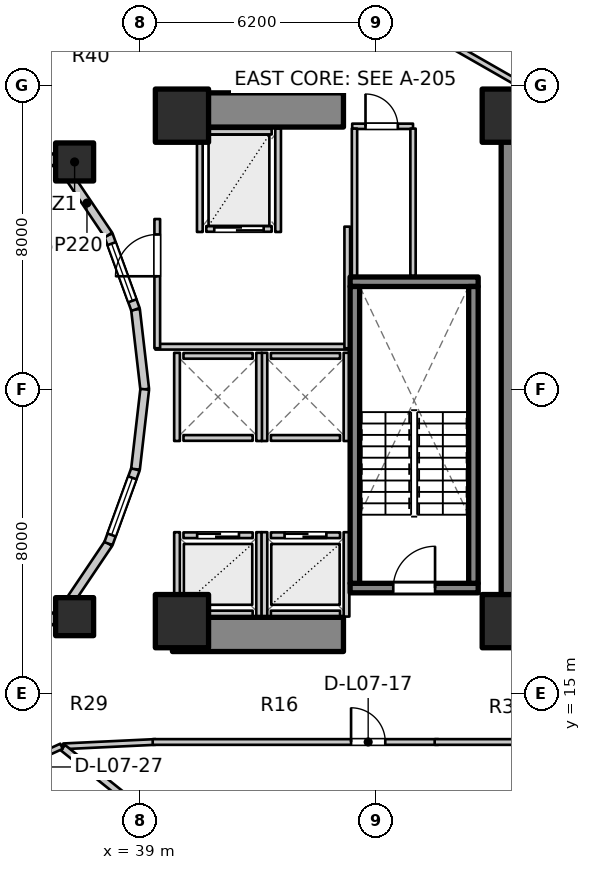
"""IFC4 building model, lengths in metres.
Left out: names, types, materials, properties, quantities, classifications, styles, units other than length and angle.
Written with IfcOpenShell. Run it as: python <this file> out.ifc"""

import sys

from ifc_helpers import new_model, si_unit, direction, frame, frame_2d, origin, origin_2d, place, context, subcontext, project, spatial, rectangle, extrude, element, fill, save


model = new_model("IFC4")
c1 = context("Model", 3, precision=1e-05, world=origin(), true_north=direction((0.0, 1.0)))
c2 = subcontext(c1, "Body", "Model", "MODEL_VIEW")
j1 = project(units=[si_unit("LENGTHUNIT", "METRE"), si_unit("PLANEANGLEUNIT", "RADIAN")], contexts=[c1])
p1 = place(None, origin())
s1 = spatial("IfcSite", under=j1, at=p1, CompositionType="ELEMENT")
p2 = place(p1, origin())
s2 = spatial("IfcBuilding", under=s1, at=p2, CompositionType="ELEMENT")
p3 = place(p2, frame((0.0, 0.0, 27.6)))
s3 = spatial("IfcBuildingStorey", under=s2, at=p3, CompositionType="ELEMENT", Elevation=27.6)
p4 = place(p3, frame((48.95, 17.05, 0.0), z_axis=(0.0, 0.0, 1.0), x_axis=(0.0, 1.0, 0.0)))
e1 = element("IfcWall", 1, at=p4, inside=s3, PredefinedType="SHEAR", context=c2, shape_type="SweptSolid", body=[
    extrude(rectangle(XDim=12.8, YDim=0.9, at=frame_2d((6.4, 0.0))), origin(), (0.0, 0.0, 1.0), 3.1),
])
for number, where, z_axis, x_axis in (
    (2, (39.85, 16.55, 0.0), (0.0, 0.0, 1.0), (1.0, 0.0, 0.0)),
    (3, (39.85, 30.35, 0.0), (0.0, 0.0, 1.0), (1.0, 0.0, 0.0)),
):
    element("IfcWall", number, at=place(p3, frame(where, z_axis=z_axis, x_axis=x_axis)), inside=s3, PredefinedType="SHEAR", context=c2, shape_type="SweptSolid", body=[
        extrude(rectangle(XDim=4.5, YDim=0.9, at=frame_2d((2.25, 0.0))), origin(), (0.0, 0.0, 1.0), 3.1),
    ])
p5 = place(p3, frame((44.525, 17.77, 0.0), z_axis=(0.0, 0.0, 1.0), x_axis=(1.0, 0.0, 0.0)))
e4 = element("IfcWall", 4, at=p5, inside=s3, PredefinedType="SOLIDWALL", context=c2, shape_type="SweptSolid", body=[
    extrude(rectangle(XDim=3.37, YDim=0.25, at=frame_2d((1.685, 0.0))), origin(), (0.0, 0.0, 1.0), 3.1),
])
p6 = place(p5, frame((1.135, 0.0, 0.0)))
e5 = element("IfcOpeningElement", 5, at=p6, cuts=e4, PredefinedType="OPENING", context=c2, shape_type="SweptSolid", body=[
    extrude(rectangle(XDim=1.1, YDim=2.1, at=frame_2d((0.55, 1.05))), frame((0.0, 0.135, 0.0), z_axis=(0.0, -1.0, 0.0), x_axis=(1.0, 0.0, 0.0)), (0.0, 0.0, 1.0), 0.27),
])
p7 = place(p3, frame((44.525, 25.83, 0.0), z_axis=(0.0, 0.0, 1.0), x_axis=(1.0, 0.0, 0.0)))
e6 = element("IfcWall", 6, at=p7, inside=s3, PredefinedType="SOLIDWALL", context=c2, shape_type="SweptSolid", body=[
    extrude(rectangle(XDim=3.37, YDim=0.25, at=frame_2d((1.685, 0.0))), origin(), (0.0, 0.0, 1.0), 3.1),
])
for number, where, z_axis, x_axis in (
    (7, (44.65, 17.895, 0.0), (0.0, 0.0, 1.0), (0.0, 1.0, 0.0)),
    (8, (47.77, 17.895, 0.0), (0.0, 0.0, 1.0), (0.0, 1.0, 0.0)),
):
    element("IfcWall", number, at=place(p3, frame(where, z_axis=z_axis, x_axis=x_axis)), inside=s3, PredefinedType="SOLIDWALL", context=c2, shape_type="SweptSolid", body=[
        extrude(rectangle(XDim=7.81, YDim=0.25, at=frame_2d((3.905, 0.0))), origin(), (0.0, 0.0, 1.0), 3.1),
    ])
for number, where, z_axis, x_axis in (
    (9, (40.1, 16.9, 0.0), (0.0, 0.0, 1.0), (1.0, 0.0, 0.0)),
    (10, (48.7, 16.9, 0.0), (0.0, 0.0, 1.0), (1.0, 0.0, 0.0)),
    (11, (48.7, 30.2, 0.0), (0.0, 0.0, 1.0), (1.0, 0.0, 0.0)),
    (12, (40.1, 30.2, 0.0), (0.0, 0.0, 1.0), (1.0, 0.0, 0.0)),
):
    element("IfcColumn", number, at=place(p3, frame(where, z_axis=z_axis, x_axis=x_axis)), inside=s3, PredefinedType="COLUMN", context=c2, shape_type="SweptSolid", body=[
        extrude(rectangle(XDim=1.4, YDim=1.4, at=origin_2d()), origin(), (0.0, 0.0, 1.0), 3.1),
    ])
for number, where, z_axis, x_axis in (
    (13, (37.275, 28.982, 0.0), (0.0, 0.0, 1.0), (1.0, 0.0, 0.0)),
    (14, (37.275, 17.018, 0.0), (0.0, 0.0, 1.0), (1.0, 0.0, 0.0)),
):
    element("IfcColumn", number, at=place(p3, frame(where, z_axis=z_axis, x_axis=x_axis)), inside=s3, PredefinedType="COLUMN", context=c2, shape_type="SweptSolid", body=[
        extrude(rectangle(XDim=1.0, YDim=1.0, at=origin_2d()), origin(), (0.0, 0.0, 1.0), 3.1),
    ])
p8 = place(p3, frame((39.12, 23.0, 0.0), z_axis=(0.0, 0.0, 1.0), x_axis=(-0.114711713601, 0.993398823617, 0.0)))
e15 = element("IfcWall", 15, at=p8, inside=s3, PredefinedType="STANDARD", context=c2, shape_type="SweptSolid", body=[
    extrude(rectangle(XDim=2.115, YDim=0.23, at=frame_2d((1.058, 0.0))), origin(), (0.0, 0.0, 1.0), 2.84),
])
p9 = place(p3, frame((38.877, 25.102, 0.0), z_axis=(0.0, 0.0, 1.0), x_axis=(-0.341423187295, 0.93990968033, 0.0)))
e16 = element("IfcWall", 16, at=p9, inside=s3, PredefinedType="STANDARD", context=c2, shape_type="SweptSolid", body=[
    extrude(rectangle(XDim=2.084, YDim=0.23, at=frame_2d((1.042, 0.0))), origin(), (0.0, 0.0, 1.0), 2.84),
])
p10 = place(p9, frame((0.242, 0.0, 0.85)))
e17 = element("IfcOpeningElement", 17, at=p10, cuts=e16, PredefinedType="OPENING", context=c2, shape_type="SweptSolid", body=[
    extrude(rectangle(XDim=1.6, YDim=1.65, at=frame_2d((0.8, 0.825))), frame((0.0, 0.125, 0.0), z_axis=(0.0, -1.0, 0.0), x_axis=(1.0, 0.0, 0.0)), (0.0, 0.0, 1.0), 0.25),
])
p11 = place(p3, frame((38.166, 27.06, 0.0), z_axis=(0.0, 0.0, 1.0), x_axis=(-0.558197800898, 0.829707909492, 0.0)))
e18 = element("IfcWall", 18, at=p11, inside=s3, PredefinedType="STANDARD", context=c2, shape_type="SweptSolid", body=[
    extrude(rectangle(XDim=2.027, YDim=0.23, at=frame_2d((1.013, 0.0))), origin(), (0.0, 0.0, 1.0), 2.16),
])
for number, where, z_axis, x_axis in (
    (19, (37.035, 28.742, 0.0), (0.0, 0.0, 1.0), (-0.753, 0.659, 0.0)),
    (20, (35.56, 15.968, 0.0), (0.0, 0.0, 1.0), (0.753, 0.659, 0.0)),
):
    element("IfcWall", number, at=place(p3, frame(where, z_axis=z_axis, x_axis=x_axis)), inside=s3, PredefinedType="STANDARD", context=c2, shape_type="SweptSolid", body=[
        extrude(rectangle(XDim=1.959, YDim=0.23, at=frame_2d((0.98, 0.0))), origin(), (0.0, 0.0, 1.0), 2.16),
    ])
p12 = place(p3, frame((37.035, 17.258, 0.0), z_axis=(0.0, 0.0, 1.0), x_axis=(0.558197800898, 0.829707909492, 0.0)))
e21 = element("IfcWall", 21, at=p12, inside=s3, PredefinedType="STANDARD", context=c2, shape_type="SweptSolid", body=[
    extrude(rectangle(XDim=2.027, YDim=0.23, at=frame_2d((1.013, 0.0))), origin(), (0.0, 0.0, 1.0), 2.16),
])
p13 = place(p3, frame((38.166, 18.94, 0.0), z_axis=(0.0, 0.0, 1.0), x_axis=(0.341423187295, 0.93990968033, 0.0)))
e22 = element("IfcWall", 22, at=p13, inside=s3, PredefinedType="STANDARD", context=c2, shape_type="SweptSolid", body=[
    extrude(rectangle(XDim=2.084, YDim=0.23, at=frame_2d((1.042, 0.0))), origin(), (0.0, 0.0, 1.0), 2.84),
])
p14 = place(p13, frame((0.242, 0.0, 0.85)))
e23 = element("IfcOpeningElement", 23, at=p14, cuts=e22, PredefinedType="OPENING", context=c2, shape_type="SweptSolid", body=[
    extrude(rectangle(XDim=1.6, YDim=1.65, at=frame_2d((0.8, 0.825))), frame((0.0, 0.125, 0.0), z_axis=(0.0, -1.0, 0.0), x_axis=(1.0, 0.0, 0.0)), (0.0, 0.0, 1.0), 0.25),
])
p15 = place(p3, frame((38.877, 20.898, 0.0), z_axis=(0.0, 0.0, 1.0), x_axis=(0.114711713601, 0.993398823617, 0.0)))
e24 = element("IfcWall", 24, at=p15, inside=s3, PredefinedType="STANDARD", context=c2, shape_type="SweptSolid", body=[
    extrude(rectangle(XDim=2.115, YDim=0.23, at=frame_2d((1.058, 0.0))), origin(), (0.0, 0.0, 1.0), 2.84),
])
p16 = place(p3, frame((40.14, 19.16, 0.0), z_axis=(0.0, 0.0, 1.0), x_axis=(1.0, 0.0, 0.0)))
e25 = element("IfcWall", 25, at=p16, inside=s3, PredefinedType="SOLIDWALL", context=c2, shape_type="SweptSolid", body=[
    extrude(rectangle(XDim=1.82, YDim=0.15, at=frame_2d((0.91, 0.0))), origin(), (0.0, 0.0, 1.0), 2.12),
])
p17 = place(p16, frame((0.36, 0.0, 0.0)))
e26 = element("IfcOpeningElement", 26, at=p17, cuts=e25, PredefinedType="OPENING", context=c2, shape_type="SweptSolid", body=[
    extrude(rectangle(XDim=1.1, YDim=2.1, at=frame_2d((0.55, 1.05))), frame((0.0, 0.085, 0.0), z_axis=(0.0, -1.0, 0.0), x_axis=(1.0, 0.0, 0.0)), (0.0, 0.0, 1.0), 0.17),
])
p18 = place(p3, frame((40.14, 17.1, 0.0), z_axis=(0.0, 0.0, 1.0), x_axis=(1.0, 0.0, 0.0)))
e27 = element("IfcWall", 27, at=p18, inside=s3, PredefinedType="SOLIDWALL", context=c2, shape_type="SweptSolid", body=[
    extrude(rectangle(XDim=1.82, YDim=0.15, at=frame_2d((0.91, 0.0))), origin(), (0.0, 0.0, 1.0), 2.12),
])
p19 = place(p3, frame((39.97, 17.02, 0.0), z_axis=(0.0, 0.0, 1.0), x_axis=(0.0, 1.0, 0.0)))
e28 = element("IfcWall", 28, at=p19, inside=s3, PredefinedType="SOLIDWALL", context=c2, shape_type="SweptSolid", body=[
    extrude(rectangle(XDim=2.22, YDim=0.15, at=frame_2d((1.11, 0.0))), origin(), (0.0, 0.0, 1.0), 2.12),
])
p20 = place(p3, frame((42.13, 17.02, 0.0), z_axis=(0.0, 0.0, 1.0), x_axis=(0.0, 1.0, 0.0)))
e29 = element("IfcWall", 29, at=p20, inside=s3, PredefinedType="SOLIDWALL", context=c2, shape_type="SweptSolid", body=[
    extrude(rectangle(XDim=2.22, YDim=0.15, at=frame_2d((1.11, 0.0))), origin(), (0.0, 0.0, 1.0), 2.855),
])
p21 = place(p3, frame((42.44, 19.16, 0.0), z_axis=(0.0, 0.0, 1.0), x_axis=(1.0, 0.0, 0.0)))
e30 = element("IfcWall", 30, at=p21, inside=s3, PredefinedType="SOLIDWALL", context=c2, shape_type="SweptSolid", body=[
    extrude(rectangle(XDim=1.82, YDim=0.15, at=frame_2d((0.91, 0.0))), origin(), (0.0, 0.0, 1.0), 2.855),
])
p22 = place(p21, frame((0.36, 0.0, 0.0)))
e31 = element("IfcOpeningElement", 31, at=p22, cuts=e30, PredefinedType="OPENING", context=c2, shape_type="SweptSolid", body=[
    extrude(rectangle(XDim=1.1, YDim=2.1, at=frame_2d((0.55, 1.05))), frame((0.0, 0.085, 0.0), z_axis=(0.0, -1.0, 0.0), x_axis=(1.0, 0.0, 0.0)), (0.0, 0.0, 1.0), 0.17),
])
p23 = place(p3, frame((42.44, 17.1, 0.0), z_axis=(0.0, 0.0, 1.0), x_axis=(1.0, 0.0, 0.0)))
e32 = element("IfcWall", 32, at=p23, inside=s3, PredefinedType="SOLIDWALL", context=c2, shape_type="SweptSolid", body=[
    extrude(rectangle(XDim=1.82, YDim=0.15, at=frame_2d((0.91, 0.0))), origin(), (0.0, 0.0, 1.0), 2.855),
])
p24 = place(p3, frame((42.27, 17.02, 0.0), z_axis=(0.0, 0.0, 1.0), x_axis=(0.0, 1.0, 0.0)))
e33 = element("IfcWall", 33, at=p24, inside=s3, PredefinedType="SOLIDWALL", context=c2, shape_type="SweptSolid", body=[
    extrude(rectangle(XDim=2.22, YDim=0.15, at=frame_2d((1.11, 0.0))), origin(), (0.0, 0.0, 1.0), 2.855),
])
p25 = place(p3, frame((44.43, 17.02, 0.0), z_axis=(0.0, 0.0, 1.0), x_axis=(0.0, 1.0, 0.0)))
e34 = element("IfcWall", 34, at=p25, inside=s3, PredefinedType="SOLIDWALL", context=c2, shape_type="SweptSolid", body=[
    extrude(rectangle(XDim=2.22, YDim=0.15, at=frame_2d((1.11, 0.0))), origin(), (0.0, 0.0, 1.0), 2.12),
])
for number, where, z_axis, x_axis in (
    (35, (42.44, 21.72, 0.0), (0.0, 0.0, 1.0), (1.0, 0.0, 0.0)),
    (36, (42.44, 23.88, 0.0), (0.0, 0.0, 1.0), (1.0, 0.0, 0.0)),
):
    element("IfcWall", number, at=place(p3, frame(where, z_axis=z_axis, x_axis=x_axis)), inside=s3, PredefinedType="SOLIDWALL", context=c2, shape_type="SweptSolid", body=[
        extrude(rectangle(XDim=1.82, YDim=0.15, at=frame_2d((0.91, 0.0))), origin(), (0.0, 0.0, 1.0), 2.855),
    ])
for number, where, z_axis, x_axis in (
    (37, (42.27, 21.64, 0.0), (0.0, 0.0, 1.0), (0.0, 1.0, 0.0)),
    (38, (44.43, 21.64, 0.0), (0.0, 0.0, 1.0), (0.0, 1.0, 0.0)),
):
    element("IfcWall", number, at=place(p3, frame(where, z_axis=z_axis, x_axis=x_axis)), inside=s3, PredefinedType="SOLIDWALL", context=c2, shape_type="SweptSolid", body=[
        extrude(rectangle(XDim=2.32, YDim=0.15, at=frame_2d((1.16, 0.0))), origin(), (0.0, 0.0, 1.0), 2.855),
    ])
for number, where, z_axis, x_axis in (
    (39, (40.14, 21.72, 0.0), (0.0, 0.0, 1.0), (1.0, 0.0, 0.0)),
    (40, (40.14, 23.88, 0.0), (0.0, 0.0, 1.0), (1.0, 0.0, 0.0)),
):
    element("IfcWall", number, at=place(p3, frame(where, z_axis=z_axis, x_axis=x_axis)), inside=s3, PredefinedType="SOLIDWALL", context=c2, shape_type="SweptSolid", body=[
        extrude(rectangle(XDim=1.82, YDim=0.15, at=frame_2d((0.91, 0.0))), origin(), (0.0, 0.0, 1.0), 2.12),
    ])
p26 = place(p3, frame((39.97, 21.64, 0.0), z_axis=(0.0, 0.0, 1.0), x_axis=(0.0, 1.0, 0.0)))
e41 = element("IfcWall", 41, at=p26, inside=s3, PredefinedType="SOLIDWALL", context=c2, shape_type="SweptSolid", body=[
    extrude(rectangle(XDim=2.32, YDim=0.15, at=frame_2d((1.16, 0.0))), origin(), (0.0, 0.0, 1.0), 2.12),
])
p27 = place(p3, frame((42.13, 21.64, 0.0), z_axis=(0.0, 0.0, 1.0), x_axis=(0.0, 1.0, 0.0)))
e42 = element("IfcWall", 42, at=p27, inside=s3, PredefinedType="SOLIDWALL", context=c2, shape_type="SweptSolid", body=[
    extrude(rectangle(XDim=2.32, YDim=0.15, at=frame_2d((1.16, 0.0))), origin(), (0.0, 0.0, 1.0), 2.855),
])
p28 = place(p3, frame((40.74, 27.22, 0.0), z_axis=(0.0, 0.0, 1.0), x_axis=(1.0, 0.0, 0.0)))
e43 = element("IfcWall", 43, at=p28, inside=s3, PredefinedType="SOLIDWALL", context=c2, shape_type="SweptSolid", body=[
    extrude(rectangle(XDim=1.72, YDim=0.15, at=frame_2d((0.86, 0.0))), origin(), (0.0, 0.0, 1.0), 2.855),
])
p29 = place(p28, frame((0.21, 0.0, 0.0)))
e44 = element("IfcOpeningElement", 44, at=p29, cuts=e43, PredefinedType="OPENING", context=c2, shape_type="SweptSolid", body=[
    extrude(rectangle(XDim=1.3, YDim=2.1, at=frame_2d((0.65, 1.05))), frame((0.0, 0.085, 0.0), z_axis=(0.0, -1.0, 0.0), x_axis=(1.0, 0.0, 0.0)), (0.0, 0.0, 1.0), 0.17),
])
p30 = place(p3, frame((40.74, 29.78, 0.0), z_axis=(0.0, 0.0, 1.0), x_axis=(1.0, 0.0, 0.0)))
e45 = element("IfcWall", 45, at=p30, inside=s3, PredefinedType="SOLIDWALL", context=c2, shape_type="SweptSolid", body=[
    extrude(rectangle(XDim=1.72, YDim=0.15, at=frame_2d((0.86, 0.0))), origin(), (0.0, 0.0, 1.0), 2.855),
])
for number, where, z_axis, x_axis in (
    (46, (40.57, 27.14, 0.0), (0.0, 0.0, 1.0), (0.0, 1.0, 0.0)),
    (47, (42.63, 27.14, 0.0), (0.0, 0.0, 1.0), (0.0, 1.0, 0.0)),
):
    element("IfcWall", number, at=place(p3, frame(where, z_axis=z_axis, x_axis=x_axis)), inside=s3, PredefinedType="SOLIDWALL", context=c2, shape_type="SweptSolid", body=[
        extrude(rectangle(XDim=2.72, YDim=0.15, at=frame_2d((1.36, 0.0))), origin(), (0.0, 0.0, 1.0), 2.855),
    ])
p31 = place(p3, frame((39.4, 24.12, 0.0), z_axis=(0.0, 0.0, 1.0), x_axis=(1.0, 0.0, 0.0)))
e48 = element("IfcWall", 48, at=p31, inside=s3, PredefinedType="PARTITIONING", context=c2, shape_type="SweptSolid", body=[
    extrude(rectangle(XDim=5.08, YDim=0.15, at=frame_2d((2.54, 0.0))), origin(), (0.0, 0.0, 1.0), 2.12),
])
p32 = place(p3, frame((44.45, 24.08, 0.0), z_axis=(0.0, 0.0, 1.0), x_axis=(0.0, 1.0, 0.0)))
e49 = element("IfcWall", 49, at=p32, inside=s3, PredefinedType="PARTITIONING", context=c2, shape_type="SweptSolid", body=[
    extrude(rectangle(XDim=3.2, YDim=0.15, at=frame_2d((1.6, 0.0))), origin(), (0.0, 0.0, 1.0), 2.855),
])
p33 = place(p3, frame((39.45, 24.08, 0.0), z_axis=(0.0, 0.0, 1.0), x_axis=(0.0, 1.0, 0.0)))
e50 = element("IfcWall", 50, at=p33, inside=s3, PredefinedType="PARTITIONING", context=c2, shape_type="SweptSolid", body=[
    extrude(rectangle(XDim=3.4, YDim=0.15, at=frame_2d((1.7, 0.0))), origin(), (0.0, 0.0, 1.0), 2.855),
])
p34 = place(p33, frame((1.894, 0.0, 0.0)))
e51 = element("IfcOpeningElement", 51, at=p34, cuts=e50, PredefinedType="OPENING", context=c2, shape_type="SweptSolid", body=[
    extrude(rectangle(XDim=1.1, YDim=2.1, at=frame_2d((0.55, 1.05))), frame((0.0, 0.085, 0.0), z_axis=(0.0, -1.0, 0.0), x_axis=(1.0, 0.0, 0.0)), (0.0, 0.0, 1.0), 0.17),
])
p35 = place(p3, frame((44.58, 29.92, 0.0), z_axis=(0.0, 0.0, 1.0), x_axis=(1.0, 0.0, 0.0)))
e52 = element("IfcWall", 52, at=p35, inside=s3, PredefinedType="PLUMBINGWALL", context=c2, shape_type="SweptSolid", body=[
    extrude(rectangle(XDim=1.6, YDim=0.14, at=frame_2d((0.8, 0.0))), origin(), (0.0, 0.0, 1.0), 2.855),
])
p36 = place(p35, frame((0.35, 0.0, 0.0)))
e53 = element("IfcOpeningElement", 53, at=p36, cuts=e52, PredefinedType="OPENING", context=c2, shape_type="SweptSolid", body=[
    extrude(rectangle(XDim=0.85, YDim=2.05, at=frame_2d((0.425, 1.025))), frame((0.0, 0.08, 0.0), z_axis=(0.0, -1.0, 0.0), x_axis=(1.0, 0.0, 0.0)), (0.0, 0.0, 1.0), 0.16),
])
for number, where, z_axis, x_axis in (
    (54, (44.64, 25.98, 0.0), (0.0, 0.0, 1.0), (0.0, 1.0, 0.0)),
    (55, (46.18, 25.98, 0.0), (0.0, 0.0, 1.0), (0.0, 1.0, 0.0)),
):
    element("IfcWall", number, at=place(p3, frame(where, z_axis=z_axis, x_axis=x_axis)), inside=s3, PredefinedType="PLUMBINGWALL", context=c2, shape_type="SweptSolid", body=[
        extrude(rectangle(XDim=3.88, YDim=0.14, at=frame_2d((1.94, 0.0))), origin(), (0.0, 0.0, 1.0), 2.855),
    ])
p37 = place(p3, frame((46.757, 32.305, 0.0), z_axis=(0.0, 0.0, 1.0), x_axis=(0.867991349648, -0.496579315857, 0.0)))
e56 = element("IfcWall", 56, at=p37, inside=s3, PredefinedType="PARTITIONING", context=c2, shape_type="SweptSolid", body=[
    extrude(rectangle(XDim=2.567, YDim=0.15, at=frame_2d((1.283, 0.0))), origin(), (0.0, 0.0, 1.0), 2.069),
])
p38 = place(p3, frame((36.98, 13.606, 0.0), z_axis=(0.0, 0.0, 1.0), x_axis=(0.998877427952, 0.047369651964, 0.0)))
e57 = element("IfcWall", 57, at=p38, inside=s3, PredefinedType="PARTITIONING", context=c2, shape_type="SweptSolid", body=[
    extrude(rectangle(XDim=2.433, YDim=0.15, at=frame_2d((1.216, 0.0))), origin(), (0.0, 0.0, 1.0), 2.237),
])
p39 = place(p3, frame((39.33, 13.72, 0.0), z_axis=(0.0, 0.0, 1.0), x_axis=(1.0, 0.0, 0.0)))
e58 = element("IfcWall", 58, at=p39, inside=s3, PredefinedType="PARTITIONING", context=c2, shape_type="SweptSolid", body=[
    extrude(rectangle(XDim=7.52, YDim=0.15, at=frame_2d((3.76, 0.0))), origin(), (0.0, 0.0, 1.0), 2.237),
])
p40 = place(p39, frame((5.22, 0.0, 0.0)))
e59 = element("IfcOpeningElement", 59, at=p40, cuts=e58, PredefinedType="OPENING", context=c2, shape_type="SweptSolid", body=[
    extrude(rectangle(XDim=0.9, YDim=2.1, at=frame_2d((0.45, 1.05))), frame((0.0, 0.085, 0.0), z_axis=(0.0, -1.0, 0.0), x_axis=(1.0, 0.0, 0.0)), (0.0, 0.0, 1.0), 0.17),
])
p41 = place(p3, frame((46.75, 13.72, 0.0), z_axis=(0.0, 0.0, 1.0), x_axis=(1.0, 0.0, 0.0)))
e60 = element("IfcWall", 60, at=p41, inside=s3, PredefinedType="PARTITIONING", context=c2, shape_type="SweptSolid", body=[
    extrude(rectangle(XDim=5.05, YDim=0.15, at=frame_2d((2.525, 0.0))), origin(), (0.0, 0.0, 1.0), 2.069),
])
p42 = place(p3, frame((36.968, 13.569, 0.0), z_axis=(0.0, 0.0, 1.0), x_axis=(0.781055486744, -0.624461629428, 0.0)))
e61 = element("IfcWall", 61, at=p42, inside=s3, PredefinedType="PARTITIONING", context=c2, shape_type="SweptSolid", body=[
    extrude(rectangle(XDim=10.843, YDim=0.18, at=frame_2d((5.422, 0.0))), origin(), (0.0, 0.0, 1.0), 2.237),
])
p43 = place(p3, frame((34.543, 12.518, 0.0), z_axis=(0.0, 0.0, 1.0), x_axis=(0.909747571199, 0.415161843982, 0.0)))
e62 = element("IfcWall", 62, at=p43, inside=s3, PredefinedType="PARTITIONING", context=c2, shape_type="SweptSolid", body=[
    extrude(rectangle(XDim=2.625, YDim=0.15, at=frame_2d((1.312, 0.0))), origin(), (0.0, 0.0, 1.0), 2.237),
])
p44 = place(p43, frame((0.838, 0.0, 0.0)))
e63 = element("IfcOpeningElement", 63, at=p44, cuts=e62, PredefinedType="OPENING", context=c2, shape_type="SweptSolid", body=[
    extrude(rectangle(XDim=0.95, YDim=2.1, at=frame_2d((0.475, 1.05))), frame((0.0, 0.085, 0.0), z_axis=(0.0, -1.0, 0.0), x_axis=(1.0, 0.0, 0.0)), (0.0, 0.0, 1.0), 0.17),
])
p45 = place(p10, origin())
e64 = element("IfcWindow", 64, at=p45, inside=s3, PartitioningType="SINGLE_PANEL", PredefinedType="WINDOW", context=c2, shape_type="SweptSolid", body=[
    extrude(rectangle(XDim=1.6, YDim=1.65, at=frame_2d((0.8, 0.825))), frame((0.0, 0.03, 0.0), z_axis=(0.0, -1.0, 0.0), x_axis=(1.0, 0.0, 0.0)), (0.0, 0.0, 1.0), 0.06),
])
fill(e17, e64)
p46 = place(p14, origin())
e65 = element("IfcWindow", 65, at=p46, inside=s3, PartitioningType="SINGLE_PANEL", PredefinedType="WINDOW", context=c2, shape_type="SweptSolid", body=[
    extrude(rectangle(XDim=1.6, YDim=1.65, at=frame_2d((0.8, 0.825))), frame((0.0, 0.03, 0.0), z_axis=(0.0, -1.0, 0.0), x_axis=(1.0, 0.0, 0.0)), (0.0, 0.0, 1.0), 0.06),
])
fill(e23, e65)
p47 = place(p6, origin())
e66 = element("IfcDoor", 66, at=p47, inside=s3, OperationType="SINGLE_SWING_RIGHT", PredefinedType="DOOR", context=c2, shape_type="SweptSolid", body=[
    extrude(rectangle(XDim=1.1, YDim=2.1, at=frame_2d((0.55, 1.05))), frame((0.0, 0.025, 0.0), z_axis=(0.0, -1.0, 0.0), x_axis=(1.0, 0.0, 0.0)), (0.0, 0.0, 1.0), 0.05),
])
fill(e5, e66)
p48 = place(p17, origin())
e67 = element("IfcDoor", 67, at=p48, inside=s3, OperationType="DOUBLE_DOOR_SLIDING", PredefinedType="DOOR", context=c2, shape_type="SweptSolid", body=[
    extrude(rectangle(XDim=1.1, YDim=2.1, at=frame_2d((0.55, 1.05))), frame((0.0, 0.025, 0.0), z_axis=(0.0, -1.0, 0.0), x_axis=(1.0, 0.0, 0.0)), (0.0, 0.0, 1.0), 0.05),
])
fill(e26, e67)
p49 = place(p22, origin())
e68 = element("IfcDoor", 68, at=p49, inside=s3, OperationType="DOUBLE_DOOR_SLIDING", PredefinedType="DOOR", context=c2, shape_type="SweptSolid", body=[
    extrude(rectangle(XDim=1.1, YDim=2.1, at=frame_2d((0.55, 1.05))), frame((0.0, 0.025, 0.0), z_axis=(0.0, -1.0, 0.0), x_axis=(1.0, 0.0, 0.0)), (0.0, 0.0, 1.0), 0.05),
])
fill(e31, e68)
p50 = place(p29, origin())
e69 = element("IfcDoor", 69, at=p50, inside=s3, OperationType="DOUBLE_DOOR_SLIDING", PredefinedType="DOOR", context=c2, shape_type="SweptSolid", body=[
    extrude(rectangle(XDim=1.3, YDim=2.1, at=frame_2d((0.65, 1.05))), frame((0.0, 0.025, 0.0), z_axis=(0.0, -1.0, 0.0), x_axis=(1.0, 0.0, 0.0)), (0.0, 0.0, 1.0), 0.05),
])
fill(e44, e69)
p51 = place(p34, origin())
e70 = element("IfcDoor", 70, at=p51, inside=s3, OperationType="SINGLE_SWING_LEFT", PredefinedType="DOOR", context=c2, shape_type="SweptSolid", body=[
    extrude(rectangle(XDim=1.1, YDim=2.1, at=frame_2d((0.55, 1.05))), frame((0.0, 0.025, 0.0), z_axis=(0.0, -1.0, 0.0), x_axis=(1.0, 0.0, 0.0)), (0.0, 0.0, 1.0), 0.05),
])
fill(e51, e70)
p52 = place(p36, origin())
e71 = element("IfcDoor", 71, at=p52, inside=s3, OperationType="SINGLE_SWING_LEFT", PredefinedType="DOOR", context=c2, shape_type="SweptSolid", body=[
    extrude(rectangle(XDim=0.85, YDim=2.05, at=frame_2d((0.425, 1.025))), frame((0.0, 0.025, 0.0), z_axis=(0.0, -1.0, 0.0), x_axis=(1.0, 0.0, 0.0)), (0.0, 0.0, 1.0), 0.05),
])
fill(e53, e71)
p53 = place(p40, origin())
e72 = element("IfcDoor", 72, at=p53, inside=s3, OperationType="SINGLE_SWING_LEFT", PredefinedType="DOOR", context=c2, shape_type="SweptSolid", body=[
    extrude(rectangle(XDim=0.9, YDim=2.1, at=frame_2d((0.45, 1.05))), frame((0.0, 0.025, 0.0), z_axis=(0.0, -1.0, 0.0), x_axis=(1.0, 0.0, 0.0)), (0.0, 0.0, 1.0), 0.05),
])
fill(e59, e72)
save(model, sys.argv[1])
